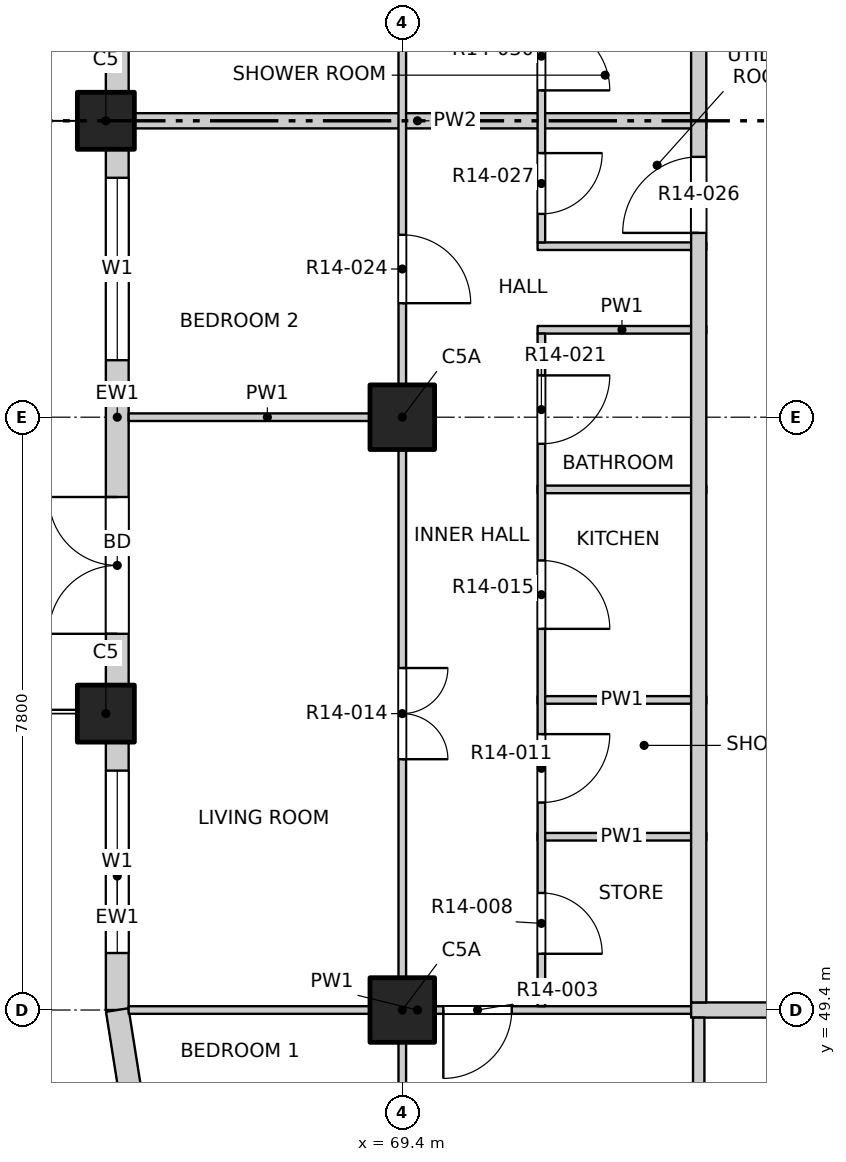
"""IFC4 building model, lengths in metres.
Left out: names, types, materials, properties, quantities, classifications, styles, units other than length and angle.
Written with IfcOpenShell. Run it as: python <this file> out.ifc"""

import sys

from ifc_helpers import new_model, si_unit, direction, frame, frame_2d, origin, origin_2d, place, context, subcontext, project, spatial, rectangle, extrude, element, fill, save


model = new_model("IFC4")
c1 = context("Model", 3, precision=1e-05, world=origin(), true_north=direction((0.0, 1.0)))
c2 = subcontext(c1, "Body", "Model", "MODEL_VIEW")
j1 = project(units=[si_unit("LENGTHUNIT", "METRE"), si_unit("PLANEANGLEUNIT", "RADIAN")], contexts=[c1])
p1 = place(None, origin())
s1 = spatial("IfcSite", under=j1, at=p1, CompositionType="ELEMENT")
p2 = place(p1, origin())
s2 = spatial("IfcBuilding", under=s1, at=p2, CompositionType="ELEMENT")
p3 = place(p2, frame((0.0, 0.0, 155.4)))
s3 = spatial("IfcBuildingStorey", under=s2, at=p3, CompositionType="ELEMENT", Elevation=155.4)
for number, where, z_axis, x_axis in (
    (1, (65.5, 53.3, -0.25), (0.0, 0.0, 1.0), (1.0, 0.0, 0.0)),
    (2, (65.5, 61.1, -0.25), (0.0, 0.0, 1.0), (1.0, 0.0, 0.0)),
):
    element("IfcColumn", number, at=place(p3, frame(where, z_axis=z_axis, x_axis=x_axis)), inside=s3, PredefinedType="COLUMN", context=c2, shape_type="SweptSolid", body=[
        extrude(rectangle(XDim=0.75, YDim=0.75, at=origin_2d()), origin(), (0.0, 0.0, 1.0), 3.4),
    ])
for number, where, z_axis, x_axis in (
    (3, (69.4, 49.4, -0.25), (0.0, 0.0, 1.0), (1.0, 0.0, 0.0)),
    (4, (69.4, 57.2, -0.25), (0.0, 0.0, 1.0), (1.0, 0.0, 0.0)),
):
    element("IfcColumn", number, at=place(p3, frame(where, z_axis=z_axis, x_axis=x_axis)), inside=s3, PredefinedType="COLUMN", context=c2, shape_type="SweptSolid", body=[
        extrude(rectangle(XDim=0.85, YDim=0.85, at=origin_2d()), origin(), (0.0, 0.0, 1.0), 3.4),
    ])
p4 = place(p3, frame((65.65, 49.4, 0.0), z_axis=(0.0, 0.0, 1.0), x_axis=(0.0, 1.0, 0.0)))
e5 = element("IfcWall", 5, at=p4, inside=s3, PredefinedType="SOLIDWALL", context=c2, shape_type="SweptSolid", body=[
    extrude(rectangle(XDim=3.525, YDim=0.3, at=frame_2d((1.763, 0.0))), origin(), (0.0, 0.0, 1.0), 2.7),
])
p5 = place(p4, frame((0.75, 0.0, 0.9)))
e6 = element("IfcOpeningElement", 6, at=p5, cuts=e5, PredefinedType="OPENING", context=c2, shape_type="SweptSolid", body=[
    extrude(rectangle(XDim=2.4, YDim=1.8, at=frame_2d((1.2, 0.9))), frame((0.0, 0.16, 0.0), z_axis=(0.0, -1.0, 0.0), x_axis=(1.0, 0.0, 0.0)), (0.0, 0.0, 1.0), 0.32),
])
p6 = place(p3, frame((65.65, 53.675, 0.0), z_axis=(0.0, 0.0, 1.0), x_axis=(0.0, 1.0, 0.0)))
e7 = element("IfcWall", 7, at=p6, inside=s3, PredefinedType="SOLIDWALL", context=c2, shape_type="SweptSolid", body=[
    extrude(rectangle(XDim=7.05, YDim=0.3, at=frame_2d((3.525, 0.0))), origin(), (0.0, 0.0, 1.0), 2.7),
])
p7 = place(p6, frame((0.675, 0.0, 0.0)))
e8 = element("IfcOpeningElement", 8, at=p7, cuts=e7, PredefinedType="OPENING", context=c2, shape_type="SweptSolid", body=[
    extrude(rectangle(XDim=1.8, YDim=2.4, at=frame_2d((0.9, 1.2))), frame((0.0, 0.16, 0.0), z_axis=(0.0, -1.0, 0.0), x_axis=(1.0, 0.0, 0.0)), (0.0, 0.0, 1.0), 0.32),
])
p8 = place(p6, frame((4.275, 0.0, 0.9)))
e9 = element("IfcOpeningElement", 9, at=p8, cuts=e7, PredefinedType="OPENING", context=c2, shape_type="SweptSolid", body=[
    extrude(rectangle(XDim=2.4, YDim=1.8, at=frame_2d((1.2, 0.9))), frame((0.0, 0.16, 0.0), z_axis=(0.0, -1.0, 0.0), x_axis=(1.0, 0.0, 0.0)), (0.0, 0.0, 1.0), 0.32),
])
p9 = place(p3, frame((65.65, 61.475, 0.0), z_axis=(0.0, 0.0, 1.0), x_axis=(0.0, 1.0, 0.0)))
e10 = element("IfcWall", 10, at=p9, inside=s3, PredefinedType="SOLIDWALL", context=c2, shape_type="SweptSolid", body=[
    extrude(rectangle(XDim=7.05, YDim=0.3, at=frame_2d((3.525, 0.0))), origin(), (0.0, 0.0, 1.0), 2.7),
])
p10 = place(p9, frame((0.675, 0.0, 0.0)))
e11 = element("IfcOpeningElement", 11, at=p10, cuts=e10, PredefinedType="OPENING", context=c2, shape_type="SweptSolid", body=[
    extrude(rectangle(XDim=1.8, YDim=2.4, at=frame_2d((0.9, 1.2))), frame((0.0, 0.16, 0.0), z_axis=(0.0, -1.0, 0.0), x_axis=(1.0, 0.0, 0.0)), (0.0, 0.0, 1.0), 0.32),
])
p11 = place(p9, frame((4.275, 0.0, 0.9)))
e12 = element("IfcOpeningElement", 12, at=p11, cuts=e10, PredefinedType="OPENING", context=c2, shape_type="SweptSolid", body=[
    extrude(rectangle(XDim=2.4, YDim=1.8, at=frame_2d((1.2, 0.9))), frame((0.0, 0.16, 0.0), z_axis=(0.0, -1.0, 0.0), x_axis=(1.0, 0.0, 0.0)), (0.0, 0.0, 1.0), 0.32),
])
p12 = place(p3, frame((65.65, 49.4, 0.0), z_axis=(0.0, 0.0, 1.0), x_axis=(0.156496880861, -0.987678452879, 0.0)))
e13 = element("IfcWall", 13, at=p12, inside=s3, PredefinedType="SOLIDWALL", context=c2, shape_type="SweptSolid", body=[
    extrude(rectangle(XDim=1.173, YDim=0.3, at=frame_2d((0.586, 0.0))), origin(), (0.0, 0.0, 1.0), 2.7),
])
p13 = place(p3, frame((65.8, 49.4, 0.0), z_axis=(0.0, 0.0, 1.0), x_axis=(1.0, 0.0, 0.0)))
e14 = element("IfcWall", 14, at=p13, inside=s3, PredefinedType="PARTITIONING", context=c2, shape_type="SweptSolid", body=[
    extrude(rectangle(XDim=7.6, YDim=0.1, at=frame_2d((3.8, 0.0))), origin(), (0.0, 0.0, 1.0), 3.15),
])
p14 = place(p13, frame((4.14, 0.0, 0.0)))
e15 = element("IfcOpeningElement", 15, at=p14, cuts=e14, PredefinedType="OPENING", context=c2, shape_type="SweptSolid", body=[
    extrude(rectangle(XDim=0.9, YDim=2.1, at=frame_2d((0.45, 1.05))), frame((0.0, 0.06, 0.0), z_axis=(0.0, -1.0, 0.0), x_axis=(1.0, 0.0, 0.0)), (0.0, 0.0, 1.0), 0.12),
])
p15 = place(p3, frame((73.2, 49.4, 0.0), z_axis=(0.0, 0.0, 1.0), x_axis=(1.0, 0.0, 0.0)))
e16 = element("IfcWall", 16, at=p15, inside=s3, PredefinedType="PARTITIONING", context=c2, shape_type="SweptSolid", body=[
    extrude(rectangle(XDim=23.6, YDim=0.2, at=frame_2d((11.8, 0.0))), origin(), (0.0, 0.0, 1.0), 3.15),
])
p16 = place(p15, frame((4.525, 0.0, 0.0)))
e17 = element("IfcOpeningElement", 17, at=p16, cuts=e16, PredefinedType="OPENING", context=c2, shape_type="SweptSolid", body=[
    extrude(rectangle(XDim=1.2, YDim=2.1, at=frame_2d((0.6, 1.05))), frame((0.0, 0.11, 0.0), z_axis=(0.0, -1.0, 0.0), x_axis=(1.0, 0.0, 0.0)), (0.0, 0.0, 1.0), 0.22),
])
p17 = place(p15, frame((12.325, 0.0, 0.0)))
e18 = element("IfcOpeningElement", 18, at=p17, cuts=e16, PredefinedType="OPENING", context=c2, shape_type="SweptSolid", body=[
    extrude(rectangle(XDim=1.2, YDim=2.1, at=frame_2d((0.6, 1.05))), frame((0.0, 0.11, 0.0), z_axis=(0.0, -1.0, 0.0), x_axis=(1.0, 0.0, 0.0)), (0.0, 0.0, 1.0), 0.22),
])
p18 = place(p15, frame((20.125, 0.0, 0.0)))
e19 = element("IfcOpeningElement", 19, at=p18, cuts=e16, PredefinedType="OPENING", context=c2, shape_type="SweptSolid", body=[
    extrude(rectangle(XDim=1.2, YDim=2.1, at=frame_2d((0.6, 1.05))), frame((0.0, 0.11, 0.0), z_axis=(0.0, -1.0, 0.0), x_axis=(1.0, 0.0, 0.0)), (0.0, 0.0, 1.0), 0.22),
])
for number, where, z_axis, x_axis in (
    (20, (71.18, 51.68, 0.0), (0.0, 0.0, 1.0), (1.0, 0.0, 0.0)),
    (21, (71.18, 53.48, 0.0), (0.0, 0.0, 1.0), (1.0, 0.0, 0.0)),
    (22, (71.18, 56.25, 0.0), (0.0, 0.0, 1.0), (1.0, 0.0, 0.0)),
):
    element("IfcWall", number, at=place(p3, frame(where, z_axis=z_axis, x_axis=x_axis)), inside=s3, PredefinedType="PARTITIONING", context=c2, shape_type="SweptSolid", body=[
        extrude(rectangle(XDim=2.22, YDim=0.1, at=frame_2d((1.11, 0.0))), origin(), (0.0, 0.0, 1.0), 3.15),
    ])
p19 = place(p3, frame((65.8, 57.2, 0.0), z_axis=(0.0, 0.0, 1.0), x_axis=(1.0, 0.0, 0.0)))
e23 = element("IfcWall", 23, at=p19, inside=s3, PredefinedType="PARTITIONING", context=c2, shape_type="SweptSolid", body=[
    extrude(rectangle(XDim=3.65, YDim=0.1, at=frame_2d((1.825, 0.0))), origin(), (0.0, 0.0, 1.0), 3.15),
])
for number, where, z_axis, x_axis in (
    (24, (71.18, 58.35, 0.0), (0.0, 0.0, 1.0), (1.0, 0.0, 0.0)),
    (25, (71.18, 59.45, 0.0), (0.0, 0.0, 1.0), (1.0, 0.0, 0.0)),
):
    element("IfcWall", number, at=place(p3, frame(where, z_axis=z_axis, x_axis=x_axis)), inside=s3, PredefinedType="PARTITIONING", context=c2, shape_type="SweptSolid", body=[
        extrude(rectangle(XDim=2.22, YDim=0.1, at=frame_2d((1.11, 0.0))), origin(), (0.0, 0.0, 1.0), 3.15),
    ])
p20 = place(p3, frame((65.8, 61.1, 0.0), z_axis=(0.0, 0.0, 1.0), x_axis=(1.0, 0.0, 0.0)))
e26 = element("IfcWall", 26, at=p20, inside=s3, PredefinedType="PARTITIONING", context=c2, shape_type="SweptSolid", body=[
    extrude(rectangle(XDim=7.6, YDim=0.2, at=frame_2d((3.8, 0.0))), origin(), (0.0, 0.0, 1.0), 2.55),
])
p21 = place(p3, frame((69.4, 45.8, 0.0), z_axis=(0.0, 0.0, 1.0), x_axis=(0.0, 1.0, 0.0)))
e27 = element("IfcWall", 27, at=p21, inside=s3, PredefinedType="PARTITIONING", context=c2, shape_type="SweptSolid", body=[
    extrude(rectangle(XDim=38.4, YDim=0.1, at=frame_2d((19.2, 0.0))), origin(), (0.0, 0.0, 1.0), 3.15),
])
p22 = place(p21, frame((1.05, 0.0, 0.0)))
e28 = element("IfcOpeningElement", 28, at=p22, cuts=e27, PredefinedType="OPENING", context=c2, shape_type="SweptSolid", body=[
    extrude(rectangle(XDim=1.2, YDim=2.1, at=frame_2d((0.6, 1.05))), frame((0.0, 0.06, 0.0), z_axis=(0.0, -1.0, 0.0), x_axis=(1.0, 0.0, 0.0)), (0.0, 0.0, 1.0), 0.12),
])
p23 = place(p21, frame((6.9, 0.0, 0.0)))
e29 = element("IfcOpeningElement", 29, at=p23, cuts=e27, PredefinedType="OPENING", context=c2, shape_type="SweptSolid", body=[
    extrude(rectangle(XDim=1.2, YDim=2.1, at=frame_2d((0.6, 1.05))), frame((0.0, 0.06, 0.0), z_axis=(0.0, -1.0, 0.0), x_axis=(1.0, 0.0, 0.0)), (0.0, 0.0, 1.0), 0.12),
])
p24 = place(p21, frame((12.9, 0.0, 0.0)))
e30 = element("IfcOpeningElement", 30, at=p24, cuts=e27, PredefinedType="OPENING", context=c2, shape_type="SweptSolid", body=[
    extrude(rectangle(XDim=0.9, YDim=2.1, at=frame_2d((0.45, 1.05))), frame((0.0, 0.06, 0.0), z_axis=(0.0, -1.0, 0.0), x_axis=(1.0, 0.0, 0.0)), (0.0, 0.0, 1.0), 0.12),
])
p25 = place(p21, frame((16.8, 0.0, 0.0)))
e31 = element("IfcOpeningElement", 31, at=p25, cuts=e27, PredefinedType="OPENING", context=c2, shape_type="SweptSolid", body=[
    extrude(rectangle(XDim=0.9, YDim=2.1, at=frame_2d((0.45, 1.05))), frame((0.0, 0.06, 0.0), z_axis=(0.0, -1.0, 0.0), x_axis=(1.0, 0.0, 0.0)), (0.0, 0.0, 1.0), 0.12),
])
p26 = place(p21, frame((20.7, 0.0, 0.0)))
e32 = element("IfcOpeningElement", 32, at=p26, cuts=e27, PredefinedType="OPENING", context=c2, shape_type="SweptSolid", body=[
    extrude(rectangle(XDim=0.9, YDim=2.1, at=frame_2d((0.45, 1.05))), frame((0.0, 0.06, 0.0), z_axis=(0.0, -1.0, 0.0), x_axis=(1.0, 0.0, 0.0)), (0.0, 0.0, 1.0), 0.12),
])
p27 = place(p21, frame((24.6, 0.0, 0.0)))
e33 = element("IfcOpeningElement", 33, at=p27, cuts=e27, PredefinedType="OPENING", context=c2, shape_type="SweptSolid", body=[
    extrude(rectangle(XDim=0.9, YDim=2.1, at=frame_2d((0.45, 1.05))), frame((0.0, 0.06, 0.0), z_axis=(0.0, -1.0, 0.0), x_axis=(1.0, 0.0, 0.0)), (0.0, 0.0, 1.0), 0.12),
])
p28 = place(p21, frame((28.5, 0.0, 0.0)))
e34 = element("IfcOpeningElement", 34, at=p28, cuts=e27, PredefinedType="OPENING", context=c2, shape_type="SweptSolid", body=[
    extrude(rectangle(XDim=0.9, YDim=2.1, at=frame_2d((0.45, 1.05))), frame((0.0, 0.06, 0.0), z_axis=(0.0, -1.0, 0.0), x_axis=(1.0, 0.0, 0.0)), (0.0, 0.0, 1.0), 0.12),
])
p29 = place(p21, frame((32.4, 0.0, 0.0)))
e35 = element("IfcOpeningElement", 35, at=p29, cuts=e27, PredefinedType="OPENING", context=c2, shape_type="SweptSolid", body=[
    extrude(rectangle(XDim=0.9, YDim=2.1, at=frame_2d((0.45, 1.05))), frame((0.0, 0.06, 0.0), z_axis=(0.0, -1.0, 0.0), x_axis=(1.0, 0.0, 0.0)), (0.0, 0.0, 1.0), 0.12),
])
p30 = place(p21, frame((36.15, 0.0, 0.0)))
e36 = element("IfcOpeningElement", 36, at=p30, cuts=e27, PredefinedType="OPENING", context=c2, shape_type="SweptSolid", body=[
    extrude(rectangle(XDim=1.2, YDim=2.1, at=frame_2d((0.6, 1.05))), frame((0.0, 0.06, 0.0), z_axis=(0.0, -1.0, 0.0), x_axis=(1.0, 0.0, 0.0)), (0.0, 0.0, 1.0), 0.12),
])
p31 = place(p3, frame((71.23, 49.45, 0.0), z_axis=(0.0, 0.0, 1.0), x_axis=(0.0, 1.0, 0.0)))
e37 = element("IfcWall", 37, at=p31, inside=s3, PredefinedType="PARTITIONING", context=c2, shape_type="SweptSolid", body=[
    extrude(rectangle(XDim=8.85, YDim=0.1, at=frame_2d((4.425, 0.0))), origin(), (0.0, 0.0, 1.0), 3.15),
])
p32 = place(p31, frame((0.69, 0.0, 0.0)))
e38 = element("IfcOpeningElement", 38, at=p32, cuts=e37, PredefinedType="OPENING", context=c2, shape_type="SweptSolid", body=[
    extrude(rectangle(XDim=0.8, YDim=2.1, at=frame_2d((0.4, 1.05))), frame((0.0, 0.06, 0.0), z_axis=(0.0, -1.0, 0.0), x_axis=(1.0, 0.0, 0.0)), (0.0, 0.0, 1.0), 0.12),
])
p33 = place(p31, frame((2.68, 0.0, 0.0)))
e39 = element("IfcOpeningElement", 39, at=p33, cuts=e37, PredefinedType="OPENING", context=c2, shape_type="SweptSolid", body=[
    extrude(rectangle(XDim=0.9, YDim=2.1, at=frame_2d((0.45, 1.05))), frame((0.0, 0.06, 0.0), z_axis=(0.0, -1.0, 0.0), x_axis=(1.0, 0.0, 0.0)), (0.0, 0.0, 1.0), 0.12),
])
p34 = place(p31, frame((4.965, 0.0, 0.0)))
e40 = element("IfcOpeningElement", 40, at=p34, cuts=e37, PredefinedType="OPENING", context=c2, shape_type="SweptSolid", body=[
    extrude(rectangle(XDim=0.9, YDim=2.1, at=frame_2d((0.45, 1.05))), frame((0.0, 0.06, 0.0), z_axis=(0.0, -1.0, 0.0), x_axis=(1.0, 0.0, 0.0)), (0.0, 0.0, 1.0), 0.12),
])
p35 = place(p31, frame((7.4, 0.0, 0.0)))
e41 = element("IfcOpeningElement", 41, at=p35, cuts=e37, PredefinedType="OPENING", context=c2, shape_type="SweptSolid", body=[
    extrude(rectangle(XDim=0.9, YDim=2.1, at=frame_2d((0.45, 1.05))), frame((0.0, 0.06, 0.0), z_axis=(0.0, -1.0, 0.0), x_axis=(1.0, 0.0, 0.0)), (0.0, 0.0, 1.0), 0.12),
])
p36 = place(p3, frame((71.23, 59.5, 0.0), z_axis=(0.0, 0.0, 1.0), x_axis=(0.0, 1.0, 0.0)))
e42 = element("IfcWall", 42, at=p36, inside=s3, PredefinedType="PARTITIONING", context=c2, shape_type="SweptSolid", body=[
    extrude(rectangle(XDim=3.25, YDim=0.1, at=frame_2d((1.625, 0.0))), origin(), (0.0, 0.0, 1.0), 3.15),
])
p37 = place(p36, frame((0.375, 0.0, 0.0)))
e43 = element("IfcOpeningElement", 43, at=p37, cuts=e42, PredefinedType="OPENING", context=c2, shape_type="SweptSolid", body=[
    extrude(rectangle(XDim=0.8, YDim=2.1, at=frame_2d((0.4, 1.05))), frame((0.0, 0.06, 0.0), z_axis=(0.0, -1.0, 0.0), x_axis=(1.0, 0.0, 0.0)), (0.0, 0.0, 1.0), 0.12),
])
p38 = place(p36, frame((2.0, 0.0, 0.0)))
e44 = element("IfcOpeningElement", 44, at=p38, cuts=e42, PredefinedType="OPENING", context=c2, shape_type="SweptSolid", body=[
    extrude(rectangle(XDim=0.9, YDim=2.1, at=frame_2d((0.45, 1.05))), frame((0.0, 0.06, 0.0), z_axis=(0.0, -1.0, 0.0), x_axis=(1.0, 0.0, 0.0)), (0.0, 0.0, 1.0), 0.12),
])
p39 = place(p3, frame((73.3, 45.8, 0.0), z_axis=(0.0, 0.0, 1.0), x_axis=(0.0, 1.0, 0.0)))
e45 = element("IfcWall", 45, at=p39, inside=s3, PredefinedType="PARTITIONING", context=c2, shape_type="SweptSolid", body=[
    extrude(rectangle(XDim=3.5, YDim=0.15, at=frame_2d((1.75, 0.0))), origin(), (0.0, 0.0, 1.0), 3.15),
])
p40 = place(p3, frame((73.3, 49.5, 0.0), z_axis=(0.0, 0.0, 1.0), x_axis=(0.0, 1.0, 0.0)))
e46 = element("IfcWall", 46, at=p40, inside=s3, PredefinedType="PARTITIONING", context=c2, shape_type="SweptSolid", body=[
    extrude(rectangle(XDim=34.7, YDim=0.2, at=frame_2d((17.35, 0.0))), origin(), (0.0, 0.0, 1.0), 3.15),
])
p41 = place(p40, frame((10.125, 0.0, 0.0)))
e47 = element("IfcOpeningElement", 47, at=p41, cuts=e46, PredefinedType="OPENING", context=c2, shape_type="SweptSolid", body=[
    extrude(rectangle(XDim=1.0, YDim=2.1, at=frame_2d((0.5, 1.05))), frame((0.0, 0.11, 0.0), z_axis=(0.0, -1.0, 0.0), x_axis=(1.0, 0.0, 0.0)), (0.0, 0.0, 1.0), 0.22),
])
p42 = place(p40, frame((14.575, 0.0, 0.0)))
e48 = element("IfcOpeningElement", 48, at=p42, cuts=e46, PredefinedType="OPENING", context=c2, shape_type="SweptSolid", body=[
    extrude(rectangle(XDim=1.0, YDim=2.1, at=frame_2d((0.5, 1.05))), frame((0.0, 0.11, 0.0), z_axis=(0.0, -1.0, 0.0), x_axis=(1.0, 0.0, 0.0)), (0.0, 0.0, 1.0), 0.22),
])
p43 = place(p40, frame((26.575, 0.0, 0.0)))
e49 = element("IfcOpeningElement", 49, at=p43, cuts=e46, PredefinedType="OPENING", context=c2, shape_type="SweptSolid", body=[
    extrude(rectangle(XDim=1.0, YDim=2.1, at=frame_2d((0.5, 1.05))), frame((0.0, 0.11, 0.0), z_axis=(0.0, -1.0, 0.0), x_axis=(1.0, 0.0, 0.0)), (0.0, 0.0, 1.0), 0.22),
])
p44 = place(p5, origin())
e50 = element("IfcWindow", 50, at=p44, inside=s3, PartitioningType="DOUBLE_PANEL_VERTICAL", PredefinedType="WINDOW", context=c2, shape_type="SweptSolid", body=[
    extrude(rectangle(XDim=2.4, YDim=1.8, at=frame_2d((1.2, 0.9))), frame((0.0, 0.03, 0.0), z_axis=(0.0, -1.0, 0.0), x_axis=(1.0, 0.0, 0.0)), (0.0, 0.0, 1.0), 0.06),
])
fill(e6, e50)
p45 = place(p7, origin())
e51 = element("IfcDoor", 51, at=p45, inside=s3, OperationType="DOUBLE_DOOR_SINGLE_SWING", PredefinedType="DOOR", context=c2, shape_type="SweptSolid", body=[
    extrude(rectangle(XDim=1.8, YDim=2.4, at=frame_2d((0.9, 1.2))), frame((0.0, 0.025, 0.0), z_axis=(0.0, -1.0, 0.0), x_axis=(1.0, 0.0, 0.0)), (0.0, 0.0, 1.0), 0.05),
])
fill(e8, e51)
p46 = place(p8, origin())
e52 = element("IfcWindow", 52, at=p46, inside=s3, PartitioningType="DOUBLE_PANEL_VERTICAL", PredefinedType="WINDOW", context=c2, shape_type="SweptSolid", body=[
    extrude(rectangle(XDim=2.4, YDim=1.8, at=frame_2d((1.2, 0.9))), frame((0.0, 0.03, 0.0), z_axis=(0.0, -1.0, 0.0), x_axis=(1.0, 0.0, 0.0)), (0.0, 0.0, 1.0), 0.06),
])
fill(e9, e52)
p47 = place(p14, origin())
e53 = element("IfcDoor", 53, at=p47, inside=s3, OperationType="SINGLE_SWING_RIGHT", PredefinedType="DOOR", context=c2, shape_type="SweptSolid", body=[
    extrude(rectangle(XDim=0.9, YDim=2.1, at=frame_2d((0.45, 1.05))), frame((0.0, 0.025, 0.0), z_axis=(0.0, -1.0, 0.0), x_axis=(1.0, 0.0, 0.0)), (0.0, 0.0, 1.0), 0.05),
])
fill(e15, e53)
p48 = place(p32, origin())
e54 = element("IfcDoor", 54, at=p48, inside=s3, OperationType="SINGLE_SWING_RIGHT", PredefinedType="DOOR", context=c2, shape_type="SweptSolid", body=[
    extrude(rectangle(XDim=0.8, YDim=2.1, at=frame_2d((0.4, 1.05))), frame((0.0, 0.025, 0.0), z_axis=(0.0, -1.0, 0.0), x_axis=(1.0, 0.0, 0.0)), (0.0, 0.0, 1.0), 0.05),
])
fill(e38, e54)
p49 = place(p33, origin())
e55 = element("IfcDoor", 55, at=p49, inside=s3, OperationType="SINGLE_SWING_LEFT", PredefinedType="DOOR", context=c2, shape_type="SweptSolid", body=[
    extrude(rectangle(XDim=0.9, YDim=2.1, at=frame_2d((0.45, 1.05))), frame((0.0, 0.025, 0.0), z_axis=(0.0, -1.0, 0.0), x_axis=(1.0, 0.0, 0.0)), (0.0, 0.0, 1.0), 0.05),
])
fill(e39, e55)
p50 = place(p23, origin())
e56 = element("IfcDoor", 56, at=p50, inside=s3, OperationType="DOUBLE_DOOR_SINGLE_SWING", PredefinedType="DOOR", context=c2, shape_type="SweptSolid", body=[
    extrude(rectangle(XDim=1.2, YDim=2.1, at=frame_2d((0.6, 1.05))), frame((0.0, 0.025, 0.0), z_axis=(0.0, -1.0, 0.0), x_axis=(1.0, 0.0, 0.0)), (0.0, 0.0, 1.0), 0.05),
])
fill(e29, e56)
p51 = place(p34, origin())
e57 = element("IfcDoor", 57, at=p51, inside=s3, OperationType="SINGLE_SWING_RIGHT", PredefinedType="DOOR", context=c2, shape_type="SweptSolid", body=[
    extrude(rectangle(XDim=0.9, YDim=2.1, at=frame_2d((0.45, 1.05))), frame((0.0, 0.025, 0.0), z_axis=(0.0, -1.0, 0.0), x_axis=(1.0, 0.0, 0.0)), (0.0, 0.0, 1.0), 0.05),
])
fill(e40, e57)
p52 = place(p35, origin())
e58 = element("IfcDoor", 58, at=p52, inside=s3, OperationType="SINGLE_SWING_LEFT", PredefinedType="DOOR", context=c2, shape_type="SweptSolid", body=[
    extrude(rectangle(XDim=0.9, YDim=2.1, at=frame_2d((0.45, 1.05))), frame((0.0, 0.025, 0.0), z_axis=(0.0, -1.0, 0.0), x_axis=(1.0, 0.0, 0.0)), (0.0, 0.0, 1.0), 0.05),
])
fill(e41, e58)
p53 = place(p24, origin())
e59 = element("IfcDoor", 59, at=p53, inside=s3, OperationType="SINGLE_SWING_RIGHT", PredefinedType="DOOR", context=c2, shape_type="SweptSolid", body=[
    extrude(rectangle(XDim=0.9, YDim=2.1, at=frame_2d((0.45, 1.05))), frame((0.0, 0.025, 0.0), z_axis=(0.0, -1.0, 0.0), x_axis=(1.0, 0.0, 0.0)), (0.0, 0.0, 1.0), 0.05),
])
fill(e30, e59)
p54 = place(p41, origin())
e60 = element("IfcDoor", 60, at=p54, inside=s3, OperationType="SINGLE_SWING_RIGHT", PredefinedType="DOOR", context=c2, shape_type="SweptSolid", body=[
    extrude(rectangle(XDim=1.0, YDim=2.1, at=frame_2d((0.5, 1.05))), frame((0.0, 0.025, 0.0), z_axis=(0.0, -1.0, 0.0), x_axis=(1.0, 0.0, 0.0)), (0.0, 0.0, 1.0), 0.05),
])
fill(e47, e60)
p55 = place(p37, origin())
e61 = element("IfcDoor", 61, at=p55, inside=s3, OperationType="SINGLE_SWING_LEFT", PredefinedType="DOOR", context=c2, shape_type="SweptSolid", body=[
    extrude(rectangle(XDim=0.8, YDim=2.1, at=frame_2d((0.4, 1.05))), frame((0.0, 0.025, 0.0), z_axis=(0.0, -1.0, 0.0), x_axis=(1.0, 0.0, 0.0)), (0.0, 0.0, 1.0), 0.05),
])
fill(e43, e61)
p56 = place(p38, origin())
e62 = element("IfcDoor", 62, at=p56, inside=s3, OperationType="SINGLE_SWING_RIGHT", PredefinedType="DOOR", context=c2, shape_type="SweptSolid", body=[
    extrude(rectangle(XDim=0.9, YDim=2.1, at=frame_2d((0.45, 1.05))), frame((0.0, 0.025, 0.0), z_axis=(0.0, -1.0, 0.0), x_axis=(1.0, 0.0, 0.0)), (0.0, 0.0, 1.0), 0.05),
])
fill(e44, e62)
save(model, sys.argv[1])
